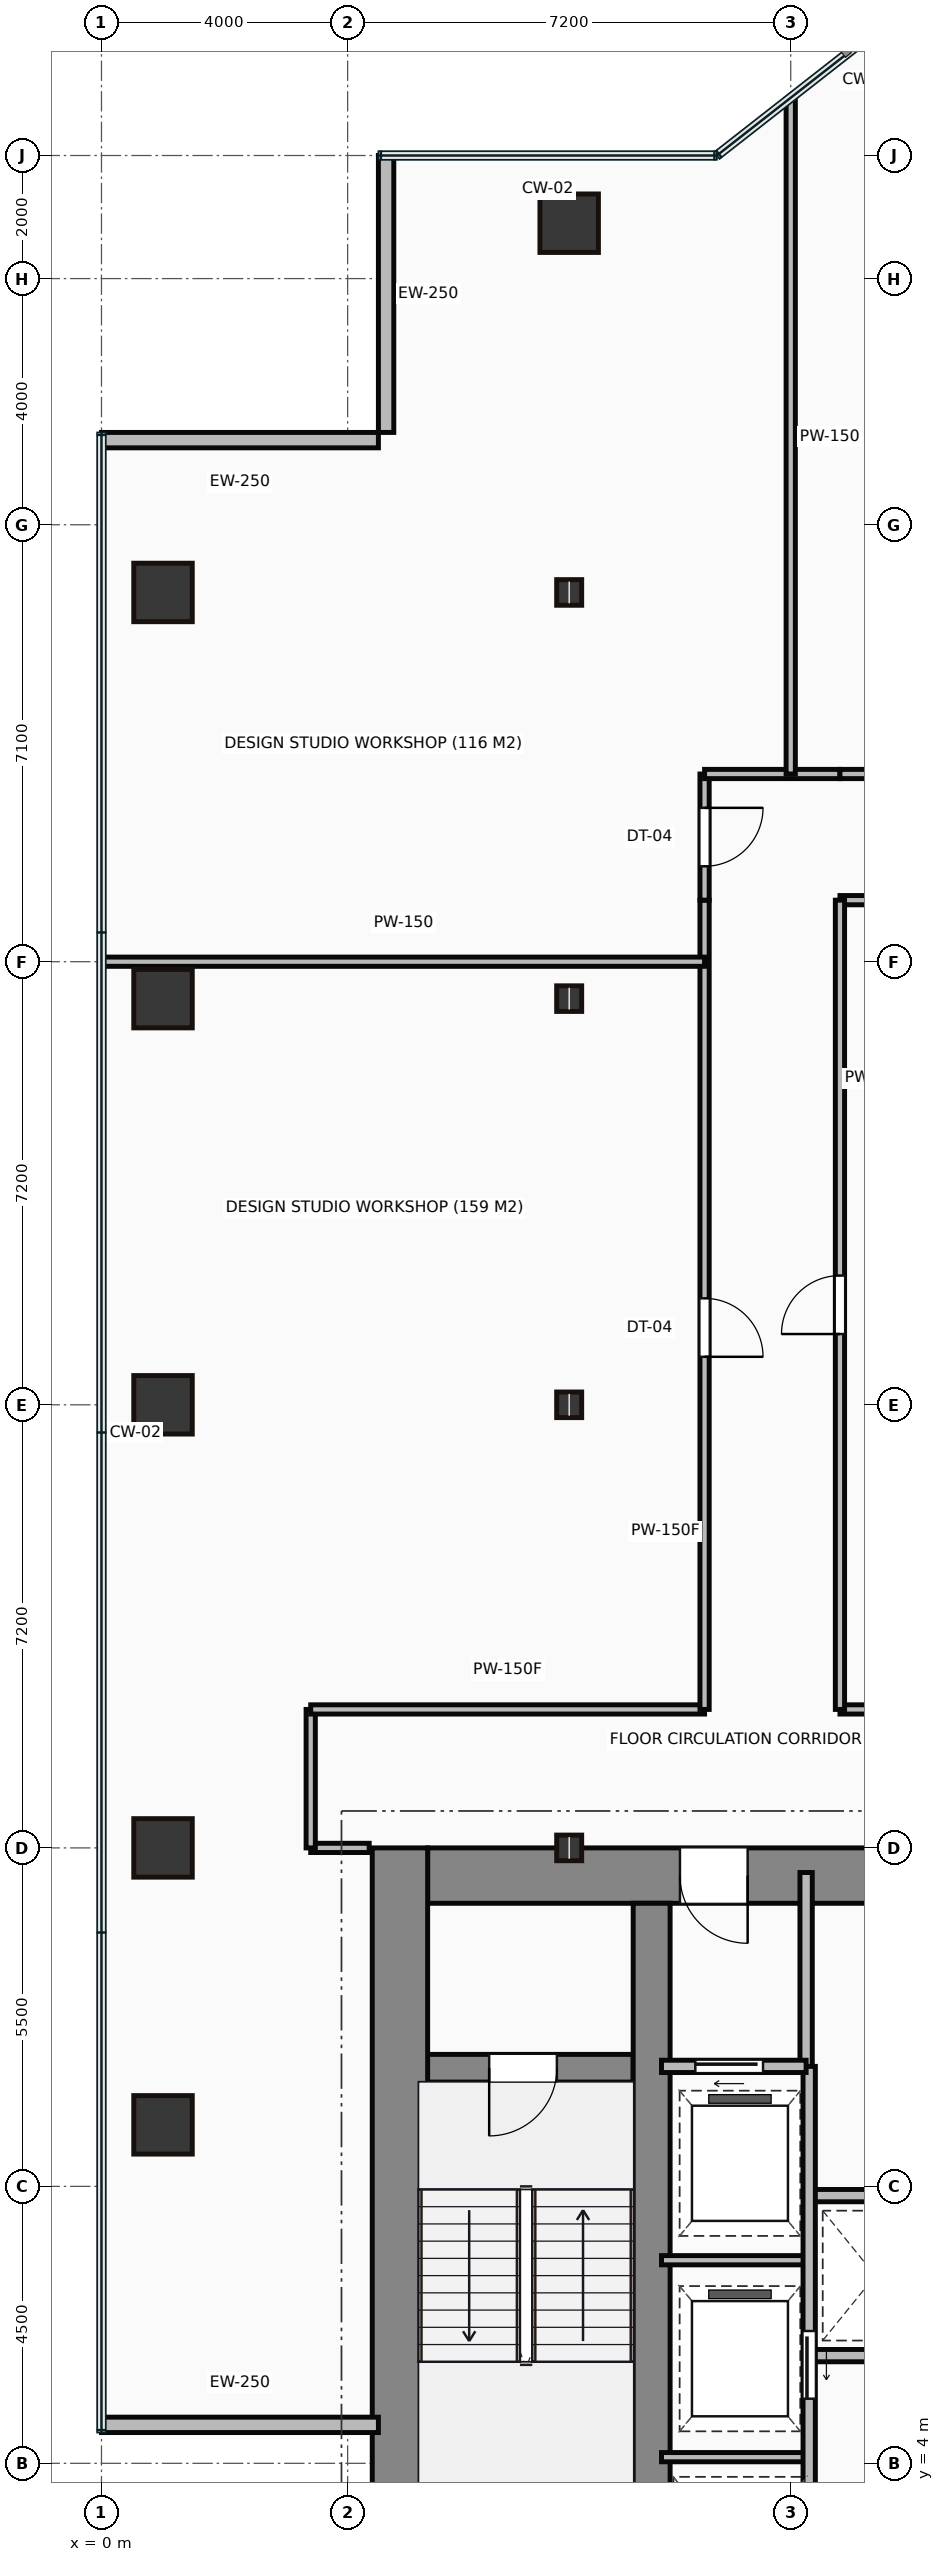
"""IFC4 building model, lengths in metres.
Left out: names, types, materials, properties, quantities, classifications, styles, units other than length and angle.
Written with IfcOpenShell. Run it as: python <this file> out.ifc"""

import sys

from ifc_helpers import new_model, si_unit, direction, frame, frame_2d, origin, origin_2d, place, context, subcontext, project, spatial, rectangle, hollow_rectangle, i_section, extrude, source, transform, mapped, element, fill, save


model = new_model("IFC4")
c1 = context("Model", 3, precision=1e-05, world=origin(), true_north=direction((0.0, 1.0)))
c2 = subcontext(c1, "Body", "Model", "MODEL_VIEW")
j1 = project(units=[si_unit("LENGTHUNIT", "METRE"), si_unit("PLANEANGLEUNIT", "RADIAN")], contexts=[c1])
p1 = place(None, origin())
s1 = spatial("IfcSite", under=j1, at=p1, CompositionType="ELEMENT")
p2 = place(p1, origin())
s2 = spatial("IfcBuilding", under=s1, at=p2, CompositionType="ELEMENT")
p3 = place(p2, frame((0.0, 0.0, 72.65)))
s3 = spatial("IfcBuildingStorey", under=s2, at=p3, CompositionType="ELEMENT", Elevation=72.65)
m1 = source(origin(), c2, "Body", "SweptSolid", [
    extrude(rectangle(XDim=13.1, YDim=0.9, at=frame_2d((6.55, 0.0))), origin(), (0.0, 0.0, 1.0), 3.65),
])
p4 = place(p3, frame((4.85, 0.9, 0.0), z_axis=(0.0, 0.0, 1.0), x_axis=(0.0, 1.0, 0.0)))
e1 = element("IfcWall", 1, at=p4, inside=s3, PredefinedType="SHEAR", context=c2, shape_type="MappedRepresentation", body=[
    mapped(m1, transform((0.0, 0.0, 0.0))),
])
m2 = source(origin(), c2, "Body", "SweptSolid", [
    extrude(rectangle(XDim=9.1, YDim=0.9, at=frame_2d((4.55, 0.0))), origin(), (0.0, 0.0, 1.0), 3.65),
])
p5 = place(p3, frame((5.3, 13.55, 0.0), z_axis=(0.0, 0.0, 1.0), x_axis=(1.0, 0.0, 0.0)))
e2 = element("IfcWall", 2, at=p5, inside=s3, PredefinedType="SHEAR", context=c2, shape_type="MappedRepresentation", body=[
    mapped(m2, transform((0.0, 0.0, 0.0))),
])
p6 = place(p5, frame((4.1, 0.0, 0.0)))
e3 = element("IfcOpeningElement", 3, at=p6, cuts=e2, PredefinedType="OPENING", context=c2, shape_type="SweptSolid", body=[
    extrude(rectangle(XDim=1.1, YDim=2.15, at=frame_2d((0.55, 1.075))), frame((0.0, 0.46, 0.0), z_axis=(0.0, -1.0, 0.0), x_axis=(1.0, 0.0, 0.0)), (0.0, 0.0, 1.0), 0.92),
])
m3 = source(origin(), c2, "Body", "SweptSolid", [
    extrude(rectangle(XDim=12.2, YDim=0.6, at=frame_2d((6.1, 0.0))), origin(), (0.0, 0.0, 1.0), 3.65),
])
p7 = place(p3, frame((8.94, 0.9, 0.0), z_axis=(0.0, 0.0, 1.0), x_axis=(0.0, 1.0, 0.0)))
e4 = element("IfcWall", 4, at=p7, inside=s3, PredefinedType="SHEAR", context=c2, shape_type="MappedRepresentation", body=[
    mapped(m3, transform((0.0, 0.0, 0.0))),
])
m4 = source(origin(), c2, "Body", "SweptSolid", [
    extrude(rectangle(XDim=3.39, YDim=0.45, at=frame_2d((1.695, 0.0))), origin(), (0.0, 0.0, 1.0), 3.65),
])
p8 = place(p3, frame((5.25, 10.42, 0.0), z_axis=(0.0, 0.0, 1.0), x_axis=(1.0, 0.0, 0.0)))
e5 = element("IfcWall", 5, at=p8, inside=s3, PredefinedType="SHEAR", context=c2, shape_type="MappedRepresentation", body=[
    mapped(m4, transform((0.0, 0.0, 0.0))),
])
p9 = place(p8, frame((1.05, 0.0, 0.0)))
e6 = element("IfcOpeningElement", 6, at=p9, cuts=e5, PredefinedType="OPENING", context=c2, shape_type="SweptSolid", body=[
    extrude(rectangle(XDim=1.1, YDim=2.15, at=frame_2d((0.55, 1.075))), frame((0.0, 0.235, 0.0), z_axis=(0.0, -1.0, 0.0), x_axis=(1.0, 0.0, 0.0)), (0.0, 0.0, 1.0), 0.47),
])
m5 = source(origin(), c2, "Body", "SweptSolid", [
    extrude(hollow_rectangle(XDim=0.95, YDim=0.95, WallThickness=0.045, at=origin_2d()), origin(), (0.0, 0.0, 1.0), 3.65),
])
for number, where, z_axis, x_axis in (
    (7, (1.0, 9.5, 0.0), (0.0, 0.0, 1.0), (1.0, 0.0, 0.0)),
    (8, (1.0, 14.0, 0.0), (0.0, 0.0, 1.0), (1.0, 0.0, 0.0)),
    (9, (1.0, 21.2, 0.0), (0.0, 0.0, 1.0), (1.0, 0.0, 0.0)),
    (10, (1.0, 27.8, 0.0), (0.0, 0.0, 1.0), (1.0, 0.0, 0.0)),
    (11, (1.0, 34.4, 0.0), (0.0, 0.0, 1.0), (1.0, 0.0, 0.0)),
):
    element("IfcColumn", number, at=place(p3, frame(where, z_axis=z_axis, x_axis=x_axis)), inside=s3, PredefinedType="COLUMN", context=c2, shape_type="MappedRepresentation", body=[
        mapped(m5, transform((0.0, 0.0, 0.0))),
    ])
m6 = source(origin(), c2, "Body", "SweptSolid", [
    extrude(i_section(OverallWidth=0.406, OverallDepth=0.416, WebThickness=0.03, FlangeThickness=0.048, at=origin_2d()), origin(), (0.0, 0.0, 1.0), 3.65),
])
for number, where, z_axis, x_axis in (
    (12, (7.6, 14.0, 0.0), (0.0, 0.0, 1.0), (1.0, 0.0, 0.0)),
    (13, (7.6, 21.2, 0.0), (0.0, 0.0, 1.0), (1.0, 0.0, 0.0)),
    (14, (7.6, 27.8, 0.0), (0.0, 0.0, 1.0), (1.0, 0.0, 0.0)),
    (15, (7.6, 34.4, 0.0), (0.0, 0.0, 1.0), (1.0, 0.0, 0.0)),
):
    element("IfcColumn", number, at=place(p3, frame(where, z_axis=z_axis, x_axis=x_axis)), inside=s3, PredefinedType="COLUMN", context=c2, shape_type="MappedRepresentation", body=[
        mapped(m6, transform((0.0, 0.0, 0.0))),
    ])
p10 = place(p3, frame((7.6, 40.4, 0.0), z_axis=(0.0, 0.0, 1.0), x_axis=(1.0, 0.0, 0.0)))
e16 = element("IfcColumn", 16, at=p10, inside=s3, PredefinedType="COLUMN", context=c2, shape_type="MappedRepresentation", body=[
    mapped(m5, transform((0.0, 0.0, 0.0))),
])
m7 = source(origin(), c2, "Body", "SweptSolid", [
    extrude(rectangle(XDim=4.5, YDim=0.25, at=frame_2d((2.25, 0.0))), origin(), (0.0, 0.0, 1.0), 3.4),
])
for number, where, z_axis, x_axis in (
    (17, (4.625, 41.5, 0.0), (0.0, 0.0, 1.0), (0.0, -1.0, 0.0)),
    (18, (4.5, 36.875, 0.0), (0.0, 0.0, 1.0), (-1.0, 0.0, 0.0)),
    (19, (0.0, 4.625, 0.0), (0.0, 0.0, 1.0), (1.0, 0.0, 0.0)),
):
    element("IfcWall", number, at=place(p3, frame(where, z_axis=z_axis, x_axis=x_axis)), inside=s3, PredefinedType="STANDARD", context=c2, shape_type="MappedRepresentation", body=[
        mapped(m7, transform((0.0, 0.0, 0.0))),
    ])
m8 = source(origin(), c2, "Body", "SweptSolid", [
    extrude(rectangle(XDim=3.18, YDim=0.2, at=frame_2d((1.59, 0.0))), origin(), (0.0, 0.0, 1.0), 3.4),
])
p11 = place(p3, frame((11.45, 10.42, 0.0), z_axis=(0.0, 0.0, 1.0), x_axis=(0.0, 1.0, 0.0)))
e20 = element("IfcWall", 20, at=p11, inside=s3, PredefinedType="PARTITIONING", context=c2, shape_type="MappedRepresentation", body=[
    mapped(m8, transform((0.0, 0.0, 0.0))),
])
m9 = source(origin(), c2, "Body", "SweptSolid", [
    extrude(rectangle(XDim=2.35, YDim=0.2, at=frame_2d((1.175, 0.0))), origin(), (0.0, 0.0, 1.0), 3.4),
])
p12 = place(p3, frame((9.1, 10.45, 0.0), z_axis=(0.0, 0.0, 1.0), x_axis=(1.0, 0.0, 0.0)))
e21 = element("IfcWall", 21, at=p12, inside=s3, PredefinedType="PARTITIONING", context=c2, shape_type="MappedRepresentation", body=[
    mapped(m9, transform((0.0, 0.0, 0.0))),
])
p13 = place(p12, frame((0.55, 0.0, 0.0)))
e22 = element("IfcOpeningElement", 22, at=p13, cuts=e21, PredefinedType="OPENING", context=c2, shape_type="SweptSolid", body=[
    extrude(rectangle(XDim=1.1, YDim=2.15, at=frame_2d((0.55, 1.075))), frame((0.0, 0.11, 0.0), z_axis=(0.0, -1.0, 0.0), x_axis=(1.0, 0.0, 0.0)), (0.0, 0.0, 1.0), 0.22),
])
m10 = source(origin(), c2, "Body", "SweptSolid", [
    extrude(rectangle(XDim=9.6, YDim=0.2, at=frame_2d((4.8, 0.0))), origin(), (0.0, 0.0, 1.0), 3.4),
])
p14 = place(p3, frame((11.5, 0.85, 0.0), z_axis=(0.0, 0.0, 1.0), x_axis=(0.0, 1.0, 0.0)))
e23 = element("IfcWall", 23, at=p14, inside=s3, PredefinedType="PARTITIONING", context=c2, shape_type="MappedRepresentation", body=[
    mapped(m10, transform((0.0, 0.0, 0.0))),
])
p15 = place(p14, frame((4.2, 0.0, 0.0)))
e24 = element("IfcOpeningElement", 24, at=p15, cuts=e23, PredefinedType="OPENING", context=c2, shape_type="SweptSolid", body=[
    extrude(rectangle(XDim=1.1, YDim=2.15, at=frame_2d((0.55, 1.075))), frame((0.0, 0.11, 0.0), z_axis=(0.0, -1.0, 0.0), x_axis=(1.0, 0.0, 0.0)), (0.0, 0.0, 1.0), 0.22),
])
p16 = place(p14, frame((0.9, 0.0, 0.0)))
e25 = element("IfcOpeningElement", 25, at=p16, cuts=e23, PredefinedType="OPENING", context=c2, shape_type="SweptSolid", body=[
    extrude(rectangle(XDim=1.2, YDim=2.15, at=frame_2d((0.6, 1.075))), frame((0.0, 0.11, 0.0), z_axis=(0.0, -1.0, 0.0), x_axis=(1.0, 0.0, 0.0)), (0.0, 0.0, 1.0), 0.22),
])
m11 = source(origin(), c2, "Body", "SweptSolid", [
    extrude(rectangle(XDim=2.4, YDim=0.15, at=frame_2d((1.2, 0.0))), origin(), (0.0, 0.0, 1.0), 3.4),
])
for number, where, z_axis, x_axis in (
    (26, (9.1, 4.1, 0.0), (0.0, 0.0, 1.0), (1.0, 0.0, 0.0)),
    (27, (9.1, 7.3, 0.0), (0.0, 0.0, 1.0), (1.0, 0.0, 0.0)),
):
    element("IfcWall", number, at=place(p3, frame(where, z_axis=z_axis, x_axis=x_axis)), inside=s3, PredefinedType="PARTITIONING", context=c2, shape_type="MappedRepresentation", body=[
        mapped(m11, transform((0.0, 0.0, 0.0))),
    ])
m12 = source(origin(), c2, "Body", "SweptSolid", [
    extrude(rectangle(XDim=11.85, YDim=0.2, at=frame_2d((5.925, 0.0))), origin(), (0.0, 0.0, 1.0), 3.4),
])
for number, where, z_axis, x_axis in (
    (28, (11.55, 5.75, 0.0), (0.0, 0.0, 1.0), (1.0, 0.0, 0.0)),
    (29, (11.55, 8.35, 0.0), (0.0, 0.0, 1.0), (1.0, 0.0, 0.0)),
):
    element("IfcWall", number, at=place(p3, frame(where, z_axis=z_axis, x_axis=x_axis)), inside=s3, PredefinedType="PARTITIONING", context=c2, shape_type="MappedRepresentation", body=[
        mapped(m12, transform((0.0, 0.0, 0.0))),
    ])
m13 = source(origin(), c2, "Body", "SweptSolid", [
    extrude(rectangle(XDim=0.95, YDim=0.15, at=frame_2d((0.475, 0.0))), origin(), (0.0, 0.0, 1.0), 2.625),
])
p17 = place(p3, frame((4.35, 14.0, 0.0), z_axis=(0.0, 0.0, 1.0), x_axis=(-1.0, 0.0, 0.0)))
e30 = element("IfcWall", 30, at=p17, inside=s3, PredefinedType="PARTITIONING", context=c2, shape_type="MappedRepresentation", body=[
    mapped(m13, transform((0.0, 0.0, 0.0))),
])
m14 = source(origin(), c2, "Body", "SweptSolid", [
    extrude(rectangle(XDim=2.25, YDim=0.15, at=frame_2d((1.125, 0.0))), origin(), (0.0, 0.0, 1.0), 3.4),
])
p18 = place(p3, frame((3.4, 14.0, 0.0), z_axis=(0.0, 0.0, 1.0), x_axis=(0.0, 1.0, 0.0)))
e31 = element("IfcWall", 31, at=p18, inside=s3, PredefinedType="PARTITIONING", context=c2, shape_type="MappedRepresentation", body=[
    mapped(m14, transform((0.0, 0.0, 0.0))),
])
m15 = source(origin(), c2, "Body", "SweptSolid", [
    extrude(rectangle(XDim=6.4, YDim=0.15, at=frame_2d((3.2, 0.0))), origin(), (0.0, 0.0, 1.0), 3.4),
])
p19 = place(p3, frame((3.4, 16.25, 0.0), z_axis=(0.0, 0.0, 1.0), x_axis=(1.0, 0.0, 0.0)))
e32 = element("IfcWall", 32, at=p19, inside=s3, PredefinedType="PARTITIONING", context=c2, shape_type="MappedRepresentation", body=[
    mapped(m15, transform((0.0, 0.0, 0.0))),
])
m16 = source(origin(), c2, "Body", "SweptSolid", [
    extrude(rectangle(XDim=13.15, YDim=0.15, at=frame_2d((6.575, 0.0))), origin(), (0.0, 0.0, 1.0), 3.4),
])
p20 = place(p3, frame((9.8, 16.25, 0.0), z_axis=(0.0, 0.0, 1.0), x_axis=(0.0, 1.0, 0.0)))
e33 = element("IfcWall", 33, at=p20, inside=s3, PredefinedType="PARTITIONING", context=c2, shape_type="MappedRepresentation", body=[
    mapped(m16, transform((0.0, 0.0, 0.0))),
])
p21 = place(p20, frame((5.73, 0.0, 0.0)))
e34 = element("IfcOpeningElement", 34, at=p21, cuts=e33, PredefinedType="OPENING", context=c2, shape_type="SweptSolid", body=[
    extrude(rectangle(XDim=0.95, YDim=2.15, at=frame_2d((0.475, 1.075))), frame((0.0, 0.085, 0.0), z_axis=(0.0, -1.0, 0.0), x_axis=(1.0, 0.0, 0.0)), (0.0, 0.0, 1.0), 0.17),
])
m17 = source(origin(), c2, "Body", "SweptSolid", [
    extrude(rectangle(XDim=2.05, YDim=0.15, at=frame_2d((1.025, 0.0))), origin(), (0.0, 0.0, 1.0), 3.4),
])
p22 = place(p3, frame((9.8, 29.4, 0.0), z_axis=(0.0, 0.0, 1.0), x_axis=(0.0, 1.0, 0.0)))
e35 = element("IfcWall", 35, at=p22, inside=s3, PredefinedType="PARTITIONING", context=c2, shape_type="MappedRepresentation", body=[
    mapped(m17, transform((0.0, 0.0, 0.0))),
])
p23 = place(p22, frame((0.55, 0.0, 0.0)))
e36 = element("IfcOpeningElement", 36, at=p23, cuts=e35, PredefinedType="OPENING", context=c2, shape_type="SweptSolid", body=[
    extrude(rectangle(XDim=0.95, YDim=2.15, at=frame_2d((0.475, 1.075))), frame((0.0, 0.085, 0.0), z_axis=(0.0, -1.0, 0.0), x_axis=(1.0, 0.0, 0.0)), (0.0, 0.0, 1.0), 0.17),
])
m18 = source(origin(), c2, "Body", "SweptSolid", [
    extrude(rectangle(XDim=2.2, YDim=0.15, at=frame_2d((1.1, 0.0))), origin(), (0.0, 0.0, 1.0), 3.4),
])
p24 = place(p3, frame((9.8, 31.45, 0.0), z_axis=(0.0, 0.0, 1.0), x_axis=(1.0, 0.0, 0.0)))
e37 = element("IfcWall", 37, at=p24, inside=s3, PredefinedType="PARTITIONING", context=c2, shape_type="MappedRepresentation", body=[
    mapped(m18, transform((0.0, 0.0, 0.0))),
])
m19 = source(origin(), c2, "Body", "SweptSolid", [
    extrude(rectangle(XDim=25.2, YDim=0.15, at=frame_2d((12.6, 0.0))), origin(), (0.0, 0.0, 1.0), 3.4),
])
p25 = place(p3, frame((12.0, 31.45, 0.0), z_axis=(0.0, 0.0, 1.0), x_axis=(1.0, 0.0, 0.0)))
e38 = element("IfcWall", 38, at=p25, inside=s3, PredefinedType="PARTITIONING", context=c2, shape_type="MappedRepresentation", body=[
    mapped(m19, transform((0.0, 0.0, 0.0))),
])
p26 = place(p25, frame((4.655, 0.0, 0.0)))
e39 = element("IfcOpeningElement", 39, at=p26, cuts=e38, PredefinedType="OPENING", context=c2, shape_type="SweptSolid", body=[
    extrude(rectangle(XDim=0.95, YDim=2.15, at=frame_2d((0.475, 1.075))), frame((0.0, 0.085, 0.0), z_axis=(0.0, -1.0, 0.0), x_axis=(1.0, 0.0, 0.0)), (0.0, 0.0, 1.0), 0.17),
])
p27 = place(p25, frame((14.925, 0.0, 0.0)))
e40 = element("IfcOpeningElement", 40, at=p27, cuts=e38, PredefinedType="OPENING", context=c2, shape_type="SweptSolid", body=[
    extrude(rectangle(XDim=0.95, YDim=2.15, at=frame_2d((0.475, 1.075))), frame((0.0, 0.085, 0.0), z_axis=(0.0, -1.0, 0.0), x_axis=(1.0, 0.0, 0.0)), (0.0, 0.0, 1.0), 0.17),
])
p28 = place(p25, frame((22.395, 0.0, 0.0)))
e41 = element("IfcOpeningElement", 41, at=p28, cuts=e38, PredefinedType="OPENING", context=c2, shape_type="SweptSolid", body=[
    extrude(rectangle(XDim=0.95, YDim=2.15, at=frame_2d((0.475, 1.075))), frame((0.0, 0.085, 0.0), z_axis=(0.0, -1.0, 0.0), x_axis=(1.0, 0.0, 0.0)), (0.0, 0.0, 1.0), 0.17),
])
p29 = place(p3, frame((12.0, 16.25, 0.0), z_axis=(0.0, 0.0, 1.0), x_axis=(1.0, 0.0, 0.0)))
e42 = element("IfcWall", 42, at=p29, inside=s3, PredefinedType="PARTITIONING", context=c2, shape_type="MappedRepresentation", body=[
    mapped(m19, transform((0.0, 0.0, 0.0))),
])
p30 = place(p29, frame((14.925, 0.0, 0.0)))
e43 = element("IfcOpeningElement", 43, at=p30, cuts=e42, PredefinedType="OPENING", context=c2, shape_type="SweptSolid", body=[
    extrude(rectangle(XDim=0.95, YDim=2.15, at=frame_2d((0.475, 1.075))), frame((0.0, 0.085, 0.0), z_axis=(0.0, -1.0, 0.0), x_axis=(1.0, 0.0, 0.0)), (0.0, 0.0, 1.0), 0.17),
])
p31 = place(p3, frame((37.2, 29.4, 0.0), z_axis=(0.0, 0.0, 1.0), x_axis=(-1.0, 0.0, 0.0)))
e44 = element("IfcWall", 44, at=p31, inside=s3, PredefinedType="PARTITIONING", context=c2, shape_type="MappedRepresentation", body=[
    mapped(m19, transform((0.0, 0.0, 0.0))),
])
p32 = place(p3, frame((12.0, 29.4, 0.0), z_axis=(0.0, 0.0, 1.0), x_axis=(0.0, -1.0, 0.0)))
e45 = element("IfcWall", 45, at=p32, inside=s3, PredefinedType="PARTITIONING", context=c2, shape_type="MappedRepresentation", body=[
    mapped(m16, transform((0.0, 0.0, 0.0))),
])
p33 = place(p32, frame((6.1, 0.0, 0.0)))
e46 = element("IfcOpeningElement", 46, at=p33, cuts=e45, PredefinedType="OPENING", context=c2, shape_type="SweptSolid", body=[
    extrude(rectangle(XDim=0.95, YDim=2.15, at=frame_2d((0.475, 1.075))), frame((0.0, 0.085, 0.0), z_axis=(0.0, -1.0, 0.0), x_axis=(1.0, 0.0, 0.0)), (0.0, 0.0, 1.0), 0.17),
])
m20 = source(origin(), c2, "Body", "SweptSolid", [
    extrude(rectangle(XDim=9.78, YDim=0.15, at=frame_2d((4.89, 0.0))), origin(), (0.0, 0.0, 1.0), 3.4),
])
p34 = place(p3, frame((0.02, 28.4, 0.0), z_axis=(0.0, 0.0, 1.0), x_axis=(1.0, 0.0, 0.0)))
e47 = element("IfcWall", 47, at=p34, inside=s3, PredefinedType="PARTITIONING", context=c2, shape_type="MappedRepresentation", body=[
    mapped(m20, transform((0.0, 0.0, 0.0))),
])
m21 = source(origin(), c2, "Body", "SweptSolid", [
    extrude(rectangle(XDim=10.963, YDim=0.15, at=frame_2d((5.482, 0.0))), origin(), (0.0, 0.0, 1.0), 3.4),
])
p35 = place(p3, frame((11.2, 42.413, 0.0), z_axis=(0.0, 0.0, 1.0), x_axis=(0.0, -1.0, 0.0)))
e48 = element("IfcWall", 48, at=p35, inside=s3, PredefinedType="PARTITIONING", context=c2, shape_type="MappedRepresentation", body=[
    mapped(m21, transform((0.0, 0.0, 0.0))),
])
m22 = source(origin(), c2, "Body", "SweptSolid", [
    extrude(rectangle(XDim=1.1, YDim=2.15, at=frame_2d((0.55, 1.075))), frame((0.0, 0.025, 0.0), z_axis=(0.0, -1.0, 0.0), x_axis=(1.0, 0.0, 0.0)), (0.0, 0.0, 1.0), 0.05),
])
p36 = place(p9, frame((1.1, 0.0, 0.0), z_axis=(0.0, 0.0, 1.0), x_axis=(-1.0, 0.0, 0.0)))
e49 = element("IfcDoor", 49, at=p36, inside=s3, OperationType="SINGLE_SWING_LEFT", PredefinedType="DOOR", context=c2, shape_type="MappedRepresentation", body=[
    mapped(m22, transform((0.0, 0.0, 0.0))),
])
fill(e6, e49)
p37 = place(p6, origin())
e50 = element("IfcDoor", 50, at=p37, inside=s3, OperationType="SINGLE_SWING_RIGHT", PredefinedType="DOOR", context=c2, shape_type="MappedRepresentation", body=[
    mapped(m22, transform((0.0, 0.0, 0.0))),
])
fill(e3, e50)
p38 = place(p13, origin())
e51 = element("IfcDoor", 51, at=p38, inside=s3, OperationType="SLIDING_TO_LEFT", PredefinedType="DOOR", context=c2, shape_type="MappedRepresentation", body=[
    mapped(m22, transform((0.0, 0.0, 0.0))),
])
fill(e22, e51)
p39 = place(p15, frame((1.1, 0.0, 0.0), z_axis=(0.0, 0.0, 1.0), x_axis=(-1.0, 0.0, 0.0)))
e52 = element("IfcDoor", 52, at=p39, inside=s3, OperationType="SLIDING_TO_LEFT", PredefinedType="DOOR", context=c2, shape_type="MappedRepresentation", body=[
    mapped(m22, transform((0.0, 0.0, 0.0))),
])
fill(e24, e52)
m23 = source(origin(), c2, "Body", "SweptSolid", [
    extrude(rectangle(XDim=0.95, YDim=2.15, at=frame_2d((0.475, 1.075))), frame((0.0, 0.025, 0.0), z_axis=(0.0, -1.0, 0.0), x_axis=(1.0, 0.0, 0.0)), (0.0, 0.0, 1.0), 0.05),
])
p40 = place(p21, origin())
e53 = element("IfcDoor", 53, at=p40, inside=s3, OperationType="SINGLE_SWING_LEFT", PredefinedType="DOOR", context=c2, shape_type="MappedRepresentation", body=[
    mapped(m23, transform((0.0, 0.0, 0.0))),
])
fill(e34, e53)
p41 = place(p23, origin())
e54 = element("IfcDoor", 54, at=p41, inside=s3, OperationType="SINGLE_SWING_RIGHT", PredefinedType="DOOR", context=c2, shape_type="MappedRepresentation", body=[
    mapped(m23, transform((0.0, 0.0, 0.0))),
])
fill(e36, e54)
p42 = place(p33, origin())
e55 = element("IfcDoor", 55, at=p42, inside=s3, OperationType="SINGLE_SWING_RIGHT", PredefinedType="DOOR", context=c2, shape_type="MappedRepresentation", body=[
    mapped(m23, transform((0.0, 0.0, 0.0))),
])
fill(e46, e55)
save(model, sys.argv[1])
